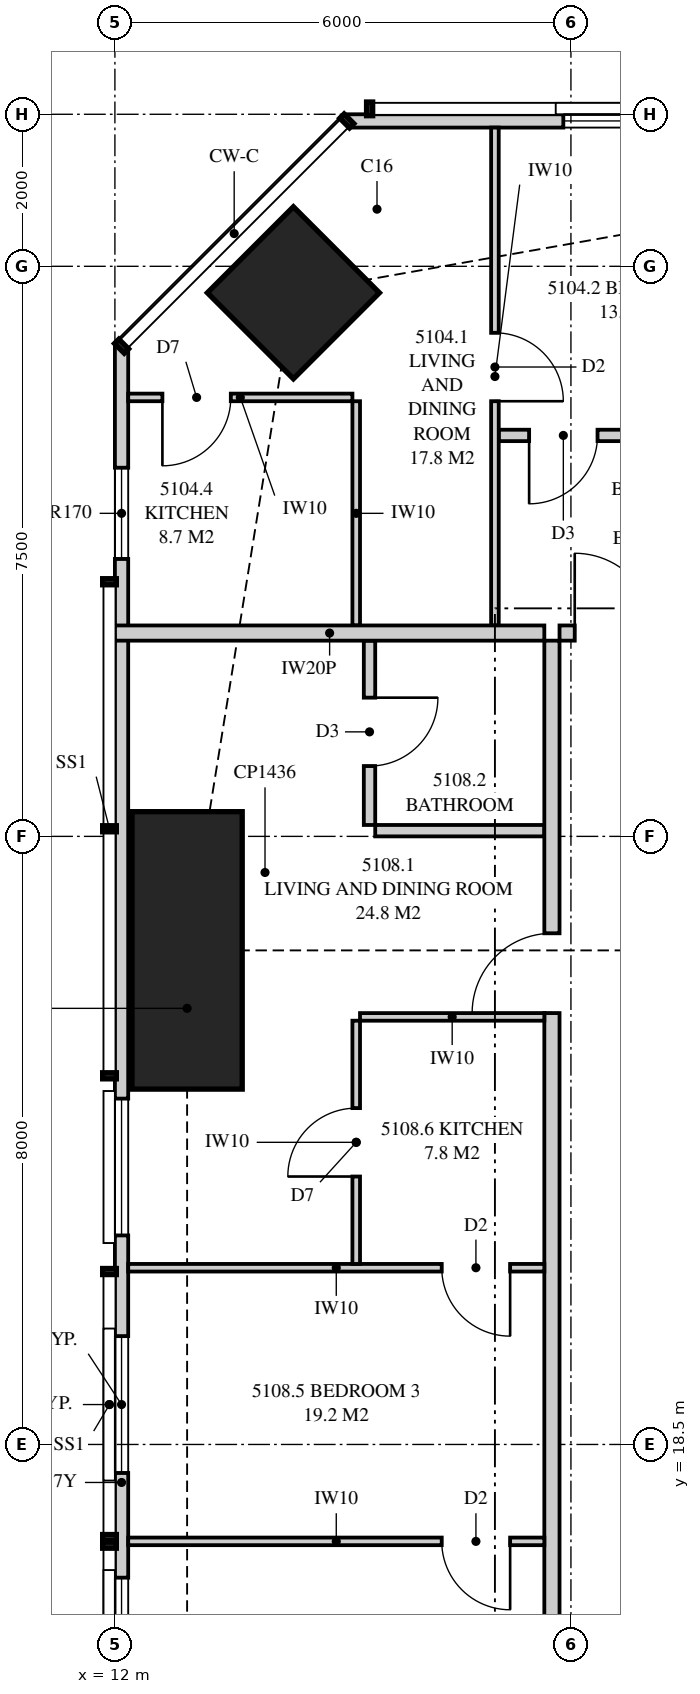
"""IFC4 building model, lengths in metres.
Left out: names, types, materials, properties, quantities, classifications, styles, units other than length and angle.
Written with IfcOpenShell. Run it as: python <this file> out.ifc"""

import sys

from ifc_helpers import new_model, si_unit, direction, frame, frame_2d, origin, origin_2d, place, context, subcontext, project, spatial, polyline, rectangle, outline, extrude, element, fill, save


model = new_model("IFC4")
c1 = context("Model", 3, precision=1e-05, world=origin(), true_north=direction((0.0, 1.0)))
c2 = subcontext(c1, "Body", "Model", "MODEL_VIEW")
j1 = project(units=[si_unit("LENGTHUNIT", "METRE"), si_unit("PLANEANGLEUNIT", "RADIAN")], contexts=[c1])
p1 = place(None, origin())
s1 = spatial("IfcSite", under=j1, at=p1, CompositionType="ELEMENT")
p2 = place(p1, origin())
s2 = spatial("IfcBuilding", under=s1, at=p2, CompositionType="ELEMENT")
p3 = place(p2, frame((0.0, 0.0, 187.85)))
s3 = spatial("IfcBuildingStorey", under=s2, at=p3, CompositionType="ELEMENT", Elevation=187.85)
p4 = place(p3, frame((14.348, 33.652, 0.0), z_axis=(0.0, 0.0, 1.0), x_axis=(0.707106781187, 0.707106781187, 0.0)))
e1 = element("IfcColumn", 1, at=p4, inside=s3, PredefinedType="COLUMN", context=c2, shape_type="SweptSolid", body=[
    extrude(rectangle(XDim=1.6, YDim=1.6, at=origin_2d()), origin(), (0.0, 0.0, 1.0), 3.35),
])
p5 = place(p3, frame((12.95, 25.0, 0.0), z_axis=(0.0, 0.0, 1.0), x_axis=(1.0, 0.0, 0.0)))
e2 = element("IfcColumn", 2, at=p5, inside=s3, PredefinedType="COLUMN", context=c2, shape_type="SweptSolid", body=[
    extrude(rectangle(XDim=1.45, YDim=3.65, at=origin_2d()), origin(), (0.0, 0.0, 1.0), 3.35),
])
p6 = place(p3, frame((49.949, 35.913, 0.0), z_axis=(0.0, 0.0, 1.0), x_axis=(-1.0, 0.0, 0.0)))
e3 = element("IfcWall", 3, at=p6, inside=s3, PredefinedType="SOLIDWALL", context=c2, shape_type="SweptSolid", body=[
    extrude(outline(polyline([(0.0, 0.0), (34.897, 0.0), (34.897, 3.11), (27.91, 3.11), (27.91, 2.15), (27.836, 2.15), (27.836, 3.11), (27.699, 3.11), (27.699, 2.15), (7.199, 2.15), (7.199, 3.11), (7.062, 3.11), (7.062, 2.15), (6.987, 2.15), (6.987, 3.11), (0.0, 3.11), (0.0, 0.0)])), frame((0.0, 0.087, 0.0), z_axis=(0.0, -1.0, 0.0), x_axis=(1.0, 0.0, 0.0)), (0.0, 0.0, 1.0), 0.175),
])
p7 = place(p6, frame((2.75, 0.0, 0.4)))
e4 = element("IfcOpeningElement", 4, at=p7, cuts=e3, PredefinedType="OPENING", context=c2, shape_type="SweptSolid", body=[
    extrude(rectangle(XDim=2.4, YDim=1.7, at=frame_2d((1.2, 0.85))), frame((0.0, 0.097, 0.0), z_axis=(0.0, -1.0, 0.0), x_axis=(1.0, 0.0, 0.0)), (0.0, 0.0, 1.0), 0.195),
])
p8 = place(p6, frame((9.124, 0.0, 0.4)))
e5 = element("IfcOpeningElement", 5, at=p8, cuts=e3, PredefinedType="OPENING", context=c2, shape_type="SweptSolid", body=[
    extrude(rectangle(XDim=1.8, YDim=1.7, at=frame_2d((0.9, 0.85))), frame((0.0, 0.097, 0.0), z_axis=(0.0, -1.0, 0.0), x_axis=(1.0, 0.0, 0.0)), (0.0, 0.0, 1.0), 0.195),
])
p9 = place(p6, frame((13.174, 0.0, 0.0)))
e6 = element("IfcOpeningElement", 6, at=p9, cuts=e3, PredefinedType="OPENING", context=c2, shape_type="SweptSolid", body=[
    extrude(rectangle(XDim=1.8, YDim=2.1, at=frame_2d((0.9, 1.05))), frame((0.0, 0.097, 0.0), z_axis=(0.0, -1.0, 0.0), x_axis=(1.0, 0.0, 0.0)), (0.0, 0.0, 1.0), 0.195),
])
p10 = place(p6, frame((19.849, 0.0, 0.4)))
e7 = element("IfcOpeningElement", 7, at=p10, cuts=e3, PredefinedType="OPENING", context=c2, shape_type="SweptSolid", body=[
    extrude(rectangle(XDim=1.8, YDim=1.7, at=frame_2d((0.9, 0.85))), frame((0.0, 0.097, 0.0), z_axis=(0.0, -1.0, 0.0), x_axis=(1.0, 0.0, 0.0)), (0.0, 0.0, 1.0), 0.195),
])
p11 = place(p6, frame((23.304, 0.0, 0.4)))
e8 = element("IfcOpeningElement", 8, at=p11, cuts=e3, PredefinedType="OPENING", context=c2, shape_type="SweptSolid", body=[
    extrude(rectangle(XDim=2.4, YDim=1.7, at=frame_2d((1.2, 0.85))), frame((0.0, 0.097, 0.0), z_axis=(0.0, -1.0, 0.0), x_axis=(1.0, 0.0, 0.0)), (0.0, 0.0, 1.0), 0.195),
])
p12 = place(p6, frame((30.249, 0.0, 0.4)))
e9 = element("IfcOpeningElement", 9, at=p12, cuts=e3, PredefinedType="OPENING", context=c2, shape_type="SweptSolid", body=[
    extrude(rectangle(XDim=1.8, YDim=1.7, at=frame_2d((0.9, 0.85))), frame((0.0, 0.097, 0.0), z_axis=(0.0, -1.0, 0.0), x_axis=(1.0, 0.0, 0.0)), (0.0, 0.0, 1.0), 0.195),
])
p13 = place(p3, frame((12.087, 32.949, 0.0), z_axis=(0.0, 0.0, 1.0), x_axis=(0.0, -1.0, 0.0)))
e10 = element("IfcWall", 10, at=p13, inside=s3, PredefinedType="SOLIDWALL", context=c2, shape_type="SweptSolid", body=[
    extrude(outline(polyline([(0.0, 0.0), (29.897, 0.0), (29.897, 3.11), (20.191, 3.11), (20.191, 2.15), (20.051, 2.15), (20.051, 3.11), (19.949, 3.11), (19.949, 2.15), (7.949, 2.15), (7.949, 3.11), (7.823, 3.11), (7.823, 2.15), (7.73, 2.15), (7.73, 3.11), (0.0, 3.11), (0.0, 0.0)])), frame((0.0, 0.087, 0.0), z_axis=(0.0, -1.0, 0.0), x_axis=(1.0, 0.0, 0.0)), (0.0, 0.0, 1.0), 0.175),
])
p14 = place(p13, frame((1.599, 0.0, 0.4)))
e11 = element("IfcOpeningElement", 11, at=p14, cuts=e10, PredefinedType="OPENING", context=c2, shape_type="SweptSolid", body=[
    extrude(rectangle(XDim=1.2, YDim=1.7, at=frame_2d((0.6, 0.85))), frame((0.0, 0.097, 0.0), z_axis=(0.0, -1.0, 0.0), x_axis=(1.0, 0.0, 0.0)), (0.0, 0.0, 1.0), 0.195),
])
p15 = place(p13, frame((9.899, 0.0, 0.4)))
e12 = element("IfcOpeningElement", 12, at=p15, cuts=e10, PredefinedType="OPENING", context=c2, shape_type="SweptSolid", body=[
    extrude(rectangle(XDim=1.8, YDim=1.7, at=frame_2d((0.9, 0.85))), frame((0.0, 0.097, 0.0), z_axis=(0.0, -1.0, 0.0), x_axis=(1.0, 0.0, 0.0)), (0.0, 0.0, 1.0), 0.195),
])
p16 = place(p13, frame((13.024, 0.0, 0.4)))
e13 = element("IfcOpeningElement", 13, at=p16, cuts=e10, PredefinedType="OPENING", context=c2, shape_type="SweptSolid", body=[
    extrude(rectangle(XDim=1.8, YDim=1.7, at=frame_2d((0.9, 0.85))), frame((0.0, 0.097, 0.0), z_axis=(0.0, -1.0, 0.0), x_axis=(1.0, 0.0, 0.0)), (0.0, 0.0, 1.0), 0.195),
])
p17 = place(p13, frame((16.201, 0.0, 0.4)))
e14 = element("IfcOpeningElement", 14, at=p17, cuts=e10, PredefinedType="OPENING", context=c2, shape_type="SweptSolid", body=[
    extrude(rectangle(XDim=1.8, YDim=1.7, at=frame_2d((0.9, 0.85))), frame((0.0, 0.097, 0.0), z_axis=(0.0, -1.0, 0.0), x_axis=(1.0, 0.0, 0.0)), (0.0, 0.0, 1.0), 0.195),
])
p18 = place(p13, frame((22.624, 0.0, 0.0)))
e15 = element("IfcOpeningElement", 15, at=p18, cuts=e10, PredefinedType="OPENING", context=c2, shape_type="SweptSolid", body=[
    extrude(rectangle(XDim=1.8, YDim=2.1, at=frame_2d((0.9, 1.05))), frame((0.0, 0.097, 0.0), z_axis=(0.0, -1.0, 0.0), x_axis=(1.0, 0.0, 0.0)), (0.0, 0.0, 1.0), 0.195),
])
p19 = place(p3, frame((17.85, 29.175, 0.0), z_axis=(0.0, 0.0, 1.0), x_axis=(1.0, 0.0, 0.0)))
e16 = element("IfcWall", 16, at=p19, inside=s3, PredefinedType="PARTITIONING", context=c2, shape_type="SweptSolid", body=[
    extrude(rectangle(XDim=2.65, YDim=0.2, at=frame_2d((1.325, 0.0))), origin(), (0.0, 0.0, 1.0), 3.11),
])
p20 = place(p19, frame((0.2, 0.0, 0.0)))
e17 = element("IfcOpeningElement", 17, at=p20, cuts=e16, PredefinedType="OPENING", context=c2, shape_type="SweptSolid", body=[
    extrude(rectangle(XDim=1.05, YDim=2.2, at=frame_2d((0.525, 1.1))), frame((0.0, 0.11, 0.0), z_axis=(0.0, -1.0, 0.0), x_axis=(1.0, 0.0, 0.0)), (0.0, 0.0, 1.0), 0.22),
])
p21 = place(p3, frame((17.0, 35.825, 0.0), z_axis=(0.0, 0.0, 1.0), x_axis=(0.0, -1.0, 0.0)))
e18 = element("IfcWall", 18, at=p21, inside=s3, PredefinedType="PARTITIONING", context=c2, shape_type="SweptSolid", body=[
    extrude(outline(polyline([(0.0, 0.0), (6.55, 0.0), (6.55, 3.11), (2.578, 3.11), (2.578, 2.15), (0.831, 2.15), (0.831, 3.11), (0.0, 3.11), (0.0, 0.0)])), frame((0.0, 0.05, 0.0), z_axis=(0.0, -1.0, 0.0), x_axis=(1.0, 0.0, 0.0)), (0.0, 0.0, 1.0), 0.1),
])
p22 = place(p21, frame((2.7, 0.0, 0.0)))
e19 = element("IfcOpeningElement", 19, at=p22, cuts=e18, PredefinedType="OPENING", context=c2, shape_type="SweptSolid", body=[
    extrude(rectangle(XDim=0.9, YDim=2.1, at=frame_2d((0.45, 1.05))), frame((0.0, 0.06, 0.0), z_axis=(0.0, -1.0, 0.0), x_axis=(1.0, 0.0, 0.0)), (0.0, 0.0, 1.0), 0.12),
])
p23 = place(p3, frame((17.05, 31.775, 0.0), z_axis=(0.0, 0.0, 1.0), x_axis=(1.0, 0.0, 0.0)))
e20 = element("IfcWall", 20, at=p23, inside=s3, PredefinedType="PLUMBINGWALL", context=c2, shape_type="SweptSolid", body=[
    extrude(rectangle(XDim=3.45, YDim=0.15, at=frame_2d((1.725, 0.0))), origin(), (0.0, 0.0, 1.0), 3.11),
])
p24 = place(p23, frame((0.4, 0.0, 0.0)))
e21 = element("IfcOpeningElement", 21, at=p24, cuts=e20, PredefinedType="OPENING", context=c2, shape_type="SweptSolid", body=[
    extrude(rectangle(XDim=0.9, YDim=2.1, at=frame_2d((0.45, 1.05))), frame((0.0, 0.085, 0.0), z_axis=(0.0, -1.0, 0.0), x_axis=(1.0, 0.0, 0.0)), (0.0, 0.0, 1.0), 0.17),
])
p25 = place(p3, frame((12.175, 32.275, 0.0), z_axis=(0.0, 0.0, 1.0), x_axis=(1.0, 0.0, 0.0)))
e22 = element("IfcWall", 22, at=p25, inside=s3, PredefinedType="PARTITIONING", context=c2, shape_type="SweptSolid", body=[
    extrude(outline(polyline([(0.0, 0.0), (2.95, 0.0), (2.95, 3.11), (2.822, 3.11), (2.822, 2.15), (1.08, 2.15), (1.08, 3.11), (0.0, 3.11), (0.0, 0.0)])), frame((0.0, 0.05, 0.0), z_axis=(0.0, -1.0, 0.0), x_axis=(1.0, 0.0, 0.0)), (0.0, 0.0, 1.0), 0.1),
])
p26 = place(p25, frame((0.45, 0.0, 0.0)))
e23 = element("IfcOpeningElement", 23, at=p26, cuts=e22, PredefinedType="OPENING", context=c2, shape_type="SweptSolid", body=[
    extrude(rectangle(XDim=0.9, YDim=2.1, at=frame_2d((0.45, 1.05))), frame((0.0, 0.06, 0.0), z_axis=(0.0, -1.0, 0.0), x_axis=(1.0, 0.0, 0.0)), (0.0, 0.0, 1.0), 0.12),
])
p27 = place(p3, frame((15.175, 32.225, 0.0), z_axis=(0.0, 0.0, 1.0), x_axis=(0.0, -1.0, 0.0)))
e24 = element("IfcWall", 24, at=p27, inside=s3, PredefinedType="PARTITIONING", context=c2, shape_type="SweptSolid", body=[
    extrude(rectangle(XDim=2.95, YDim=0.1, at=frame_2d((1.475, 0.0))), origin(), (0.0, 0.0, 1.0), 3.11),
])
p28 = place(p3, frame((12.0, 29.175, 0.0), z_axis=(0.0, 0.0, 1.0), x_axis=(1.0, 0.0, 0.0)))
e25 = element("IfcWall", 25, at=p28, inside=s3, PredefinedType="PARTITIONING", context=c2, shape_type="SweptSolid", body=[
    extrude(outline(polyline([(0.0, 0.0), (5.65, 0.0), (5.65, 3.11), (2.547, 3.11), (2.547, 2.15), (0.703, 2.15), (0.703, 3.11), (0.0, 3.11), (0.0, 0.0)])), frame((0.0, 0.1, 0.0), z_axis=(0.0, -1.0, 0.0), x_axis=(1.0, 0.0, 0.0)), (0.0, 0.0, 1.0), 0.2),
])
p29 = place(p3, frame((17.75, 7.925, 0.0), z_axis=(0.0, 0.0, 1.0), x_axis=(0.0, 1.0, 0.0)))
e26 = element("IfcWall", 26, at=p29, inside=s3, PredefinedType="PARTITIONING", context=c2, shape_type="SweptSolid", body=[
    extrude(outline(polyline([(0.0, 0.0), (21.15, 0.0), (21.15, 3.11), (17.412, 3.11), (17.412, 2.541), (16.738, 2.541), (16.738, 3.11), (5.412, 3.11), (5.412, 2.541), (4.738, 2.541), (4.738, 3.11), (0.0, 3.11), (0.0, 0.0)])), frame((0.0, 0.1, 0.0), z_axis=(0.0, -1.0, 0.0), x_axis=(1.0, 0.0, 0.0)), (0.0, 0.0, 1.0), 0.2),
])
p30 = place(p29, frame((16.25, 0.0, 0.0)))
e27 = element("IfcOpeningElement", 27, at=p30, cuts=e26, PredefinedType="OPENING", context=c2, shape_type="SweptSolid", body=[
    extrude(rectangle(XDim=1.05, YDim=2.2, at=frame_2d((0.525, 1.1))), frame((0.0, 0.11, 0.0), z_axis=(0.0, -1.0, 0.0), x_axis=(1.0, 0.0, 0.0)), (0.0, 0.0, 1.0), 0.22),
])
p31 = place(p3, frame((15.35, 26.65, 0.0), z_axis=(0.0, 0.0, 1.0), x_axis=(0.0, 1.0, 0.0)))
e28 = element("IfcWall", 28, at=p31, inside=s3, PredefinedType="PLUMBINGWALL", context=c2, shape_type="SweptSolid", body=[
    extrude(rectangle(XDim=2.425, YDim=0.15, at=frame_2d((1.212, 0.0))), origin(), (0.0, 0.0, 1.0), 3.11),
])
p32 = place(p31, frame((0.775, 0.0, 0.0)))
e29 = element("IfcOpeningElement", 29, at=p32, cuts=e28, PredefinedType="OPENING", context=c2, shape_type="SweptSolid", body=[
    extrude(rectangle(XDim=0.9, YDim=2.1, at=frame_2d((0.45, 1.05))), frame((0.0, 0.085, 0.0), z_axis=(0.0, -1.0, 0.0), x_axis=(1.0, 0.0, 0.0)), (0.0, 0.0, 1.0), 0.17),
])
p33 = place(p3, frame((15.425, 26.575, 0.0), z_axis=(0.0, 0.0, 1.0), x_axis=(1.0, 0.0, 0.0)))
e30 = element("IfcWall", 30, at=p33, inside=s3, PredefinedType="PLUMBINGWALL", context=c2, shape_type="SweptSolid", body=[
    extrude(rectangle(XDim=2.225, YDim=0.15, at=frame_2d((1.112, 0.0))), origin(), (0.0, 0.0, 1.0), 3.11),
])
p34 = place(p3, frame((12.175, 17.225, 0.0), z_axis=(0.0, 0.0, 1.0), x_axis=(1.0, 0.0, 0.0)))
e31 = element("IfcWall", 31, at=p34, inside=s3, PredefinedType="PARTITIONING", context=c2, shape_type="SweptSolid", body=[
    extrude(outline(polyline([(0.0, 0.0), (5.475, 0.0), (5.475, 3.11), (1.635, 3.11), (1.635, 2.15), (0.0, 2.15), (0.0, 3.11), (0.0, 0.0)])), frame((0.0, 0.05, 0.0), z_axis=(0.0, -1.0, 0.0), x_axis=(1.0, 0.0, 0.0)), (0.0, 0.0, 1.0), 0.1),
])
p35 = place(p34, frame((4.125, 0.0, 0.0)))
e32 = element("IfcOpeningElement", 32, at=p35, cuts=e31, PredefinedType="OPENING", context=c2, shape_type="SweptSolid", body=[
    extrude(rectangle(XDim=0.9, YDim=2.1, at=frame_2d((0.45, 1.05))), frame((0.0, 0.06, 0.0), z_axis=(0.0, -1.0, 0.0), x_axis=(1.0, 0.0, 0.0)), (0.0, 0.0, 1.0), 0.12),
])
p36 = place(p3, frame((12.175, 20.825, 0.0), z_axis=(0.0, 0.0, 1.0), x_axis=(1.0, 0.0, 0.0)))
e33 = element("IfcWall", 33, at=p36, inside=s3, PredefinedType="PARTITIONING", context=c2, shape_type="SweptSolid", body=[
    extrude(outline(polyline([(0.0, 0.0), (5.475, 0.0), (5.475, 3.11), (1.635, 3.11), (1.635, 2.15), (0.0, 2.15), (0.0, 3.11), (0.0, 0.0)])), frame((0.0, 0.05, 0.0), z_axis=(0.0, -1.0, 0.0), x_axis=(1.0, 0.0, 0.0)), (0.0, 0.0, 1.0), 0.1),
])
p37 = place(p36, frame((4.125, 0.0, 0.0)))
e34 = element("IfcOpeningElement", 34, at=p37, cuts=e33, PredefinedType="OPENING", context=c2, shape_type="SweptSolid", body=[
    extrude(rectangle(XDim=0.9, YDim=2.1, at=frame_2d((0.45, 1.05))), frame((0.0, 0.06, 0.0), z_axis=(0.0, -1.0, 0.0), x_axis=(1.0, 0.0, 0.0)), (0.0, 0.0, 1.0), 0.12),
])
p38 = place(p3, frame((15.175, 20.875, 0.0), z_axis=(0.0, 0.0, 1.0), x_axis=(0.0, 1.0, 0.0)))
e35 = element("IfcWall", 35, at=p38, inside=s3, PredefinedType="PARTITIONING", context=c2, shape_type="SweptSolid", body=[
    extrude(rectangle(XDim=3.2, YDim=0.1, at=frame_2d((1.6, 0.0))), origin(), (0.0, 0.0, 1.0), 3.11),
])
p39 = place(p38, frame((1.15, 0.0, 0.0)))
e36 = element("IfcOpeningElement", 36, at=p39, cuts=e35, PredefinedType="OPENING", context=c2, shape_type="SweptSolid", body=[
    extrude(rectangle(XDim=0.9, YDim=2.1, at=frame_2d((0.45, 1.05))), frame((0.0, 0.06, 0.0), z_axis=(0.0, -1.0, 0.0), x_axis=(1.0, 0.0, 0.0)), (0.0, 0.0, 1.0), 0.12),
])
p40 = place(p3, frame((15.225, 24.125, 0.0), z_axis=(0.0, 0.0, 1.0), x_axis=(1.0, 0.0, 0.0)))
e37 = element("IfcWall", 37, at=p40, inside=s3, PredefinedType="PARTITIONING", context=c2, shape_type="SweptSolid", body=[
    extrude(rectangle(XDim=2.425, YDim=0.1, at=frame_2d((1.212, 0.0))), origin(), (0.0, 0.0, 1.0), 3.11),
])
p41 = place(p12, origin())
e38 = element("IfcWindow", 38, at=p41, inside=s3, PartitioningType="SINGLE_PANEL", PredefinedType="WINDOW", context=c2, shape_type="SweptSolid", body=[
    extrude(rectangle(XDim=1.8, YDim=1.7, at=frame_2d((0.9, 0.85))), frame((0.0, 0.03, 0.0), z_axis=(0.0, -1.0, 0.0), x_axis=(1.0, 0.0, 0.0)), (0.0, 0.0, 1.0), 0.06),
])
fill(e9, e38)
p42 = place(p14, origin())
e39 = element("IfcWindow", 39, at=p42, inside=s3, PartitioningType="SINGLE_PANEL", PredefinedType="WINDOW", context=c2, shape_type="SweptSolid", body=[
    extrude(rectangle(XDim=1.2, YDim=1.7, at=frame_2d((0.6, 0.85))), frame((0.0, 0.03, 0.0), z_axis=(0.0, -1.0, 0.0), x_axis=(1.0, 0.0, 0.0)), (0.0, 0.0, 1.0), 0.06),
])
fill(e11, e39)
p43 = place(p15, origin())
e40 = element("IfcWindow", 40, at=p43, inside=s3, PartitioningType="SINGLE_PANEL", PredefinedType="WINDOW", context=c2, shape_type="SweptSolid", body=[
    extrude(rectangle(XDim=1.8, YDim=1.7, at=frame_2d((0.9, 0.85))), frame((0.0, 0.03, 0.0), z_axis=(0.0, -1.0, 0.0), x_axis=(1.0, 0.0, 0.0)), (0.0, 0.0, 1.0), 0.06),
])
fill(e12, e40)
p44 = place(p16, origin())
e41 = element("IfcWindow", 41, at=p44, inside=s3, PartitioningType="SINGLE_PANEL", PredefinedType="WINDOW", context=c2, shape_type="SweptSolid", body=[
    extrude(rectangle(XDim=1.8, YDim=1.7, at=frame_2d((0.9, 0.85))), frame((0.0, 0.03, 0.0), z_axis=(0.0, -1.0, 0.0), x_axis=(1.0, 0.0, 0.0)), (0.0, 0.0, 1.0), 0.06),
])
fill(e13, e41)
p45 = place(p17, origin())
e42 = element("IfcWindow", 42, at=p45, inside=s3, PartitioningType="SINGLE_PANEL", PredefinedType="WINDOW", context=c2, shape_type="SweptSolid", body=[
    extrude(rectangle(XDim=1.8, YDim=1.7, at=frame_2d((0.9, 0.85))), frame((0.0, 0.03, 0.0), z_axis=(0.0, -1.0, 0.0), x_axis=(1.0, 0.0, 0.0)), (0.0, 0.0, 1.0), 0.06),
])
fill(e14, e42)
p46 = place(p20, origin())
e43 = element("IfcDoor", 43, at=p46, inside=s3, OperationType="SINGLE_SWING_LEFT", PredefinedType="DOOR", context=c2, shape_type="SweptSolid", body=[
    extrude(rectangle(XDim=1.05, YDim=2.2, at=frame_2d((0.525, 1.1))), frame((0.0, 0.025, 0.0), z_axis=(0.0, -1.0, 0.0), x_axis=(1.0, 0.0, 0.0)), (0.0, 0.0, 1.0), 0.05),
])
fill(e17, e43)
p47 = place(p22, origin())
e44 = element("IfcDoor", 44, at=p47, inside=s3, OperationType="SINGLE_SWING_RIGHT", PredefinedType="DOOR", context=c2, shape_type="SweptSolid", body=[
    extrude(rectangle(XDim=0.9, YDim=2.1, at=frame_2d((0.45, 1.05))), frame((0.0, 0.025, 0.0), z_axis=(0.0, -1.0, 0.0), x_axis=(1.0, 0.0, 0.0)), (0.0, 0.0, 1.0), 0.05),
])
fill(e19, e44)
p48 = place(p24, frame((0.9, 0.0, 0.0), z_axis=(0.0, 0.0, 1.0), x_axis=(-1.0, 0.0, 0.0)))
e45 = element("IfcDoor", 45, at=p48, inside=s3, OperationType="SINGLE_SWING_RIGHT", PredefinedType="DOOR", context=c2, shape_type="SweptSolid", body=[
    extrude(rectangle(XDim=0.9, YDim=2.1, at=frame_2d((0.45, 1.05))), frame((0.0, 0.025, 0.0), z_axis=(0.0, -1.0, 0.0), x_axis=(1.0, 0.0, 0.0)), (0.0, 0.0, 1.0), 0.05),
])
fill(e21, e45)
p49 = place(p26, frame((0.9, 0.0, 0.0), z_axis=(0.0, 0.0, 1.0), x_axis=(-1.0, 0.0, 0.0)))
e46 = element("IfcDoor", 46, at=p49, inside=s3, OperationType="SINGLE_SWING_RIGHT", PredefinedType="DOOR", context=c2, shape_type="SweptSolid", body=[
    extrude(rectangle(XDim=0.9, YDim=2.1, at=frame_2d((0.45, 1.05))), frame((0.0, 0.025, 0.0), z_axis=(0.0, -1.0, 0.0), x_axis=(1.0, 0.0, 0.0)), (0.0, 0.0, 1.0), 0.05),
])
fill(e23, e46)
p50 = place(p30, origin())
e47 = element("IfcDoor", 47, at=p50, inside=s3, OperationType="SINGLE_SWING_LEFT", PredefinedType="DOOR", context=c2, shape_type="SweptSolid", body=[
    extrude(rectangle(XDim=1.05, YDim=2.2, at=frame_2d((0.525, 1.1))), frame((0.0, 0.025, 0.0), z_axis=(0.0, -1.0, 0.0), x_axis=(1.0, 0.0, 0.0)), (0.0, 0.0, 1.0), 0.05),
])
fill(e27, e47)
p51 = place(p32, frame((0.9, 0.0, 0.0), z_axis=(0.0, 0.0, 1.0), x_axis=(-1.0, 0.0, 0.0)))
e48 = element("IfcDoor", 48, at=p51, inside=s3, OperationType="SINGLE_SWING_LEFT", PredefinedType="DOOR", context=c2, shape_type="SweptSolid", body=[
    extrude(rectangle(XDim=0.9, YDim=2.1, at=frame_2d((0.45, 1.05))), frame((0.0, 0.025, 0.0), z_axis=(0.0, -1.0, 0.0), x_axis=(1.0, 0.0, 0.0)), (0.0, 0.0, 1.0), 0.05),
])
fill(e29, e48)
p52 = place(p35, frame((0.9, 0.0, 0.0), z_axis=(0.0, 0.0, 1.0), x_axis=(-1.0, 0.0, 0.0)))
e49 = element("IfcDoor", 49, at=p52, inside=s3, OperationType="SINGLE_SWING_LEFT", PredefinedType="DOOR", context=c2, shape_type="SweptSolid", body=[
    extrude(rectangle(XDim=0.9, YDim=2.1, at=frame_2d((0.45, 1.05))), frame((0.0, 0.025, 0.0), z_axis=(0.0, -1.0, 0.0), x_axis=(1.0, 0.0, 0.0)), (0.0, 0.0, 1.0), 0.05),
])
fill(e32, e49)
p53 = place(p37, frame((0.9, 0.0, 0.0), z_axis=(0.0, 0.0, 1.0), x_axis=(-1.0, 0.0, 0.0)))
e50 = element("IfcDoor", 50, at=p53, inside=s3, OperationType="SINGLE_SWING_LEFT", PredefinedType="DOOR", context=c2, shape_type="SweptSolid", body=[
    extrude(rectangle(XDim=0.9, YDim=2.1, at=frame_2d((0.45, 1.05))), frame((0.0, 0.025, 0.0), z_axis=(0.0, -1.0, 0.0), x_axis=(1.0, 0.0, 0.0)), (0.0, 0.0, 1.0), 0.05),
])
fill(e34, e50)
p54 = place(p39, origin())
e51 = element("IfcDoor", 51, at=p54, inside=s3, OperationType="SINGLE_SWING_LEFT", PredefinedType="DOOR", context=c2, shape_type="SweptSolid", body=[
    extrude(rectangle(XDim=0.9, YDim=2.1, at=frame_2d((0.45, 1.05))), frame((0.0, 0.025, 0.0), z_axis=(0.0, -1.0, 0.0), x_axis=(1.0, 0.0, 0.0)), (0.0, 0.0, 1.0), 0.05),
])
fill(e36, e51)
save(model, sys.argv[1])
